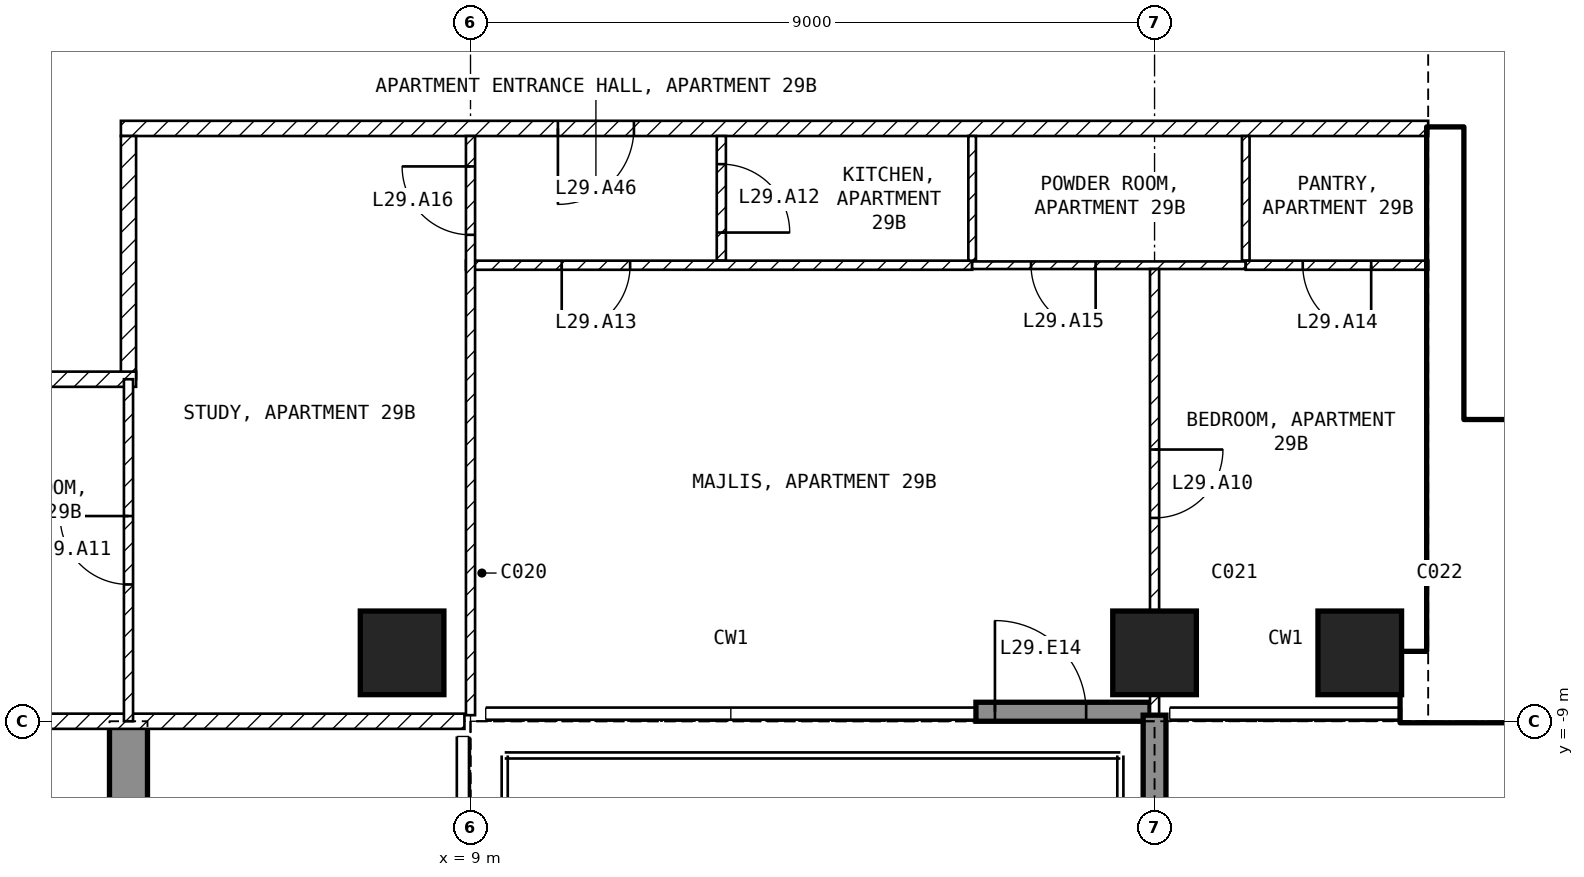
"""IFC4 building model, lengths in metres.
Left out: names, types, materials, properties, quantities, classifications, styles, units other than length and angle.
Written with IfcOpenShell. Run it as: python <this file> out.ifc"""

import sys

from ifc_helpers import new_model, si_unit, direction, frame, frame_2d, origin, origin_2d, place, context, subcontext, project, spatial, polyline, rectangle, outline, extrude, element, fill, save


model = new_model("IFC4")
c1 = context("Model", 3, precision=1e-05, world=origin(), true_north=direction((0.0, 1.0)))
c2 = subcontext(c1, "Body", "Model", "MODEL_VIEW")
j1 = project(units=[si_unit("LENGTHUNIT", "METRE"), si_unit("PLANEANGLEUNIT", "RADIAN")], contexts=[c1])
p1 = place(None, origin())
s1 = spatial("IfcSite", under=j1, at=p1, CompositionType="ELEMENT")
p2 = place(p1, origin())
s2 = spatial("IfcBuilding", under=s1, at=p2, CompositionType="ELEMENT")
p3 = place(p2, frame((0.0, 0.0, 123.4)))
s3 = spatial("IfcBuildingStorey", under=s2, at=p3, CompositionType="ELEMENT", Elevation=123.4)
for number, where, z_axis, x_axis in (
    (1, (8.1, -8.1, -0.25), (0.0, 0.0, 1.0), (1.0, 0.0, 0.0)),
    (2, (18.0, -8.1, -0.25), (0.0, 0.0, 1.0), (1.0, 0.0, 0.0)),
    (3, (20.7, -8.1, -0.25), (0.0, 0.0, 1.0), (1.0, 0.0, 0.0)),
):
    element("IfcColumn", number, at=place(p3, frame(where, z_axis=z_axis, x_axis=x_axis)), inside=s3, PredefinedType="COLUMN", context=c2, shape_type="SweptSolid", body=[
        extrude(rectangle(XDim=1.1, YDim=1.1, at=origin_2d()), origin(), (0.0, 0.0, 1.0), 3.5),
    ])
p4 = place(p3, frame((4.25, -20.15, -0.25), z_axis=(1.0, 0.0, 0.0), x_axis=(0.0, 1.0, 0.0)))
e4 = element("IfcWall", 4, at=p4, inside=s3, PredefinedType="SHEAR", context=c2, shape_type="SweptSolid", body=[
    extrude(outline(polyline([(0.0, 0.0), (6.65, 0.0), (6.65, 2.65), (9.05, 2.65), (9.05, 0.0), (11.15, 0.0), (11.15, 3.5), (0.0, 3.5), (0.0, 0.0)])), origin(), (0.0, 0.0, 1.0), 0.5),
])
p5 = place(p3, frame((15.65, -8.875, 0.0), z_axis=(0.0, 0.0, 1.0), x_axis=(1.0, 0.0, 0.0)))
e5 = element("IfcWall", 5, at=p5, inside=s3, PredefinedType="SOLIDWALL", context=c2, shape_type="SweptSolid", body=[
    extrude(rectangle(XDim=2.29, YDim=0.25, at=frame_2d((1.145, 0.0))), origin(), (0.0, 0.0, 1.0), 3.25),
])
p6 = place(p5, frame((0.25, 0.0, 0.0)))
e6 = element("IfcOpeningElement", 6, at=p6, cuts=e5, PredefinedType="OPENING", context=c2, shape_type="SweptSolid", body=[
    extrude(rectangle(XDim=1.2, YDim=2.4, at=frame_2d((0.6, 1.2))), frame((0.0, 0.135, 0.0), z_axis=(0.0, -1.0, 0.0), x_axis=(1.0, 0.0, 0.0)), (0.0, 0.0, 1.0), 0.27),
])
p7 = place(p3, frame((18.0, -8.92, 0.0), z_axis=(0.0, 0.0, 1.0), x_axis=(0.0, -1.0, 0.0)))
e7 = element("IfcWall", 7, at=p7, inside=s3, PredefinedType="SOLIDWALL", context=c2, shape_type="SweptSolid", body=[
    extrude(rectangle(XDim=2.82, YDim=0.3, at=frame_2d((1.41, 0.0))), origin(), (0.0, 0.0, 1.0), 3.25),
])
p8 = place(p3, frame((21.25, -8.55, 0.0), z_axis=(0.0, 0.0, 1.0), x_axis=(1.0, 0.0, 0.0)))
e8 = element("IfcWall", 8, at=p8, inside=s3, PredefinedType="SHEAR", context=c2, shape_type="SweptSolid", body=[
    extrude(rectangle(XDim=8.95, YDim=0.9, at=frame_2d((4.475, 0.0))), origin(), (0.0, 0.0, 1.0), 3.25),
])
p9 = place(p3, frame((21.825, -8.1, 0.0), z_axis=(0.0, 0.0, 1.0), x_axis=(0.0, 1.0, 0.0)))
e9 = element("IfcWall", 9, at=p9, inside=s3, PredefinedType="SHEAR", context=c2, shape_type="SweptSolid", body=[
    extrude(rectangle(XDim=6.9, YDim=0.45, at=frame_2d((3.45, 0.0))), origin(), (0.0, 0.0, 1.0), 3.25),
])
p10 = place(p3, frame((22.05, -5.15, 0.0), z_axis=(0.0, 0.0, 1.0), x_axis=(1.0, 0.0, 0.0)))
e10 = element("IfcWall", 10, at=p10, inside=s3, PredefinedType="SOLIDWALL", context=c2, shape_type="SweptSolid", body=[
    extrude(rectangle(XDim=6.3, YDim=0.2, at=frame_2d((3.15, 0.0))), origin(), (0.0, 0.0, 1.0), 3.25),
])
p11 = place(p10, frame((0.2, 0.0, 0.0)))
e11 = element("IfcOpeningElement", 11, at=p11, cuts=e10, PredefinedType="OPENING", context=c2, shape_type="SweptSolid", body=[
    extrude(rectangle(XDim=1.0, YDim=2.1, at=frame_2d((0.5, 1.05))), frame((0.0, 0.11, 0.0), z_axis=(0.0, -1.0, 0.0), x_axis=(1.0, 0.0, 0.0)), (0.0, 0.0, 1.0), 0.22),
])
p12 = place(p3, frame((21.6, -1.2, 0.0), z_axis=(0.0, 0.0, 1.0), x_axis=(-1.0, 0.0, 0.0)))
e12 = element("IfcWall", 12, at=p12, inside=s3, PredefinedType="PARTITIONING", context=c2, shape_type="SweptSolid", body=[
    extrude(rectangle(XDim=17.2, YDim=0.2, at=frame_2d((8.6, 0.0))), origin(), (0.0, 0.0, 1.0), 3.25),
])
p13 = place(p12, frame((10.45, 0.0, 0.0)))
e13 = element("IfcOpeningElement", 13, at=p13, cuts=e12, PredefinedType="OPENING", context=c2, shape_type="SweptSolid", body=[
    extrude(rectangle(XDim=1.0, YDim=2.1, at=frame_2d((0.5, 1.05))), frame((0.0, 0.11, 0.0), z_axis=(0.0, -1.0, 0.0), x_axis=(1.0, 0.0, 0.0)), (0.0, 0.0, 1.0), 0.22),
])
p14 = place(p3, frame((4.5, -1.3, 0.0), z_axis=(0.0, 0.0, 1.0), x_axis=(0.0, -1.0, 0.0)))
e14 = element("IfcWall", 14, at=p14, inside=s3, PredefinedType="PARTITIONING", context=c2, shape_type="SweptSolid", body=[
    extrude(rectangle(XDim=3.2, YDim=0.2, at=frame_2d((1.6, 0.0))), origin(), (0.0, 0.0, 1.0), 3.25),
])
p15 = place(p3, frame((4.6, -4.5, 0.0), z_axis=(0.0, 0.0, 1.0), x_axis=(-1.0, 0.0, 0.0)))
e15 = element("IfcWall", 15, at=p15, inside=s3, PredefinedType="PARTITIONING", context=c2, shape_type="SweptSolid", body=[
    extrude(rectangle(XDim=3.5, YDim=0.2, at=frame_2d((1.75, 0.0))), origin(), (0.0, 0.0, 1.0), 3.25),
])
p16 = place(p3, frame((8.92, -9.0, 0.0), z_axis=(0.0, 0.0, 1.0), x_axis=(-1.0, 0.0, 0.0)))
e16 = element("IfcWall", 16, at=p16, inside=s3, PredefinedType="PARTITIONING", context=c2, shape_type="SweptSolid", body=[
    extrude(rectangle(XDim=17.84, YDim=0.2, at=frame_2d((8.92, 0.0))), origin(), (0.0, 0.0, 1.0), 3.25),
])
p17 = place(p16, frame((8.42, 0.0, 0.0)))
e17 = element("IfcOpeningElement", 17, at=p17, cuts=e16, PredefinedType="OPENING", context=c2, shape_type="SweptSolid", body=[
    extrude(rectangle(XDim=1.0, YDim=2.1, at=frame_2d((0.5, 1.05))), frame((0.0, 0.11, 0.0), z_axis=(0.0, -1.0, 0.0), x_axis=(1.0, 0.0, 0.0)), (0.0, 0.0, 1.0), 0.22),
])
p18 = place(p3, frame((12.3, -1.3, 0.0), z_axis=(0.0, 0.0, 1.0), x_axis=(0.0, -1.0, 0.0)))
e18 = element("IfcWall", 18, at=p18, inside=s3, PredefinedType="PARTITIONING", context=c2, shape_type="SweptSolid", body=[
    extrude(rectangle(XDim=1.64, YDim=0.12, at=frame_2d((0.82, 0.0))), origin(), (0.0, 0.0, 1.0), 3.25),
])
p19 = place(p18, frame((0.37, 0.0, 0.0)))
e19 = element("IfcOpeningElement", 19, at=p19, cuts=e18, PredefinedType="OPENING", context=c2, shape_type="SweptSolid", body=[
    extrude(rectangle(XDim=0.9, YDim=2.1, at=frame_2d((0.45, 1.05))), frame((0.0, 0.07, 0.0), z_axis=(0.0, -1.0, 0.0), x_axis=(1.0, 0.0, 0.0)), (0.0, 0.0, 1.0), 0.14),
])
p20 = place(p3, frame((15.6, -3.0, 0.0), z_axis=(0.0, 0.0, 1.0), x_axis=(-1.0, 0.0, 0.0)))
e20 = element("IfcWall", 20, at=p20, inside=s3, PredefinedType="PARTITIONING", context=c2, shape_type="SweptSolid", body=[
    extrude(rectangle(XDim=6.66, YDim=0.12, at=frame_2d((3.33, 0.0))), origin(), (0.0, 0.0, 1.0), 3.25),
])
p21 = place(p20, frame((4.5, 0.0, 0.0)))
e21 = element("IfcOpeningElement", 21, at=p21, cuts=e20, PredefinedType="OPENING", context=c2, shape_type="SweptSolid", body=[
    extrude(rectangle(XDim=0.9, YDim=2.1, at=frame_2d((0.45, 1.05))), frame((0.0, 0.07, 0.0), z_axis=(0.0, -1.0, 0.0), x_axis=(1.0, 0.0, 0.0)), (0.0, 0.0, 1.0), 0.14),
])
p22 = place(p3, frame((9.0, -8.92, 0.0), z_axis=(0.0, 0.0, 1.0), x_axis=(0.0, 1.0, 0.0)))
e22 = element("IfcWall", 22, at=p22, inside=s3, PredefinedType="PARTITIONING", context=c2, shape_type="SweptSolid", body=[
    extrude(rectangle(XDim=7.62, YDim=0.12, at=frame_2d((3.81, 0.0))), origin(), (0.0, 0.0, 1.0), 3.25),
])
p23 = place(p22, frame((6.32, 0.0, 0.0)))
e23 = element("IfcOpeningElement", 23, at=p23, cuts=e22, PredefinedType="OPENING", context=c2, shape_type="SweptSolid", body=[
    extrude(rectangle(XDim=0.9, YDim=2.1, at=frame_2d((0.45, 1.05))), frame((0.0, 0.07, 0.0), z_axis=(0.0, -1.0, 0.0), x_axis=(1.0, 0.0, 0.0)), (0.0, 0.0, 1.0), 0.14),
])
for number, where, z_axis, x_axis in (
    (24, (15.6, -1.3, 0.0), (0.0, 0.0, 1.0), (0.0, -1.0, 0.0)),
    (25, (19.2, -1.3, 0.0), (0.0, 0.0, 1.0), (0.0, -1.0, 0.0)),
):
    element("IfcWall", number, at=place(p3, frame(where, z_axis=z_axis, x_axis=x_axis)), inside=s3, PredefinedType="PARTITIONING", context=c2, shape_type="SweptSolid", body=[
        extrude(rectangle(XDim=1.64, YDim=0.1, at=frame_2d((0.82, 0.0))), origin(), (0.0, 0.0, 1.0), 3.25),
    ])
p24 = place(p3, frame((19.2, -3.0, 0.0), z_axis=(0.0, 0.0, 1.0), x_axis=(-1.0, 0.0, 0.0)))
e26 = element("IfcWall", 26, at=p24, inside=s3, PredefinedType="PARTITIONING", context=c2, shape_type="SweptSolid", body=[
    extrude(rectangle(XDim=3.6, YDim=0.1, at=frame_2d((1.8, 0.0))), origin(), (0.0, 0.0, 1.0), 3.25),
])
p25 = place(p24, frame((1.975, 0.0, 0.0)))
e27 = element("IfcOpeningElement", 27, at=p25, cuts=e26, PredefinedType="OPENING", context=c2, shape_type="SweptSolid", body=[
    extrude(rectangle(XDim=0.85, YDim=2.1, at=frame_2d((0.425, 1.05))), frame((0.0, 0.06, 0.0), z_axis=(0.0, -1.0, 0.0), x_axis=(1.0, 0.0, 0.0)), (0.0, 0.0, 1.0), 0.12),
])
p26 = place(p3, frame((21.6, -3.0, 0.0), z_axis=(0.0, 0.0, 1.0), x_axis=(-1.0, 0.0, 0.0)))
e28 = element("IfcWall", 28, at=p26, inside=s3, PredefinedType="PARTITIONING", context=c2, shape_type="SweptSolid", body=[
    extrude(rectangle(XDim=2.4, YDim=0.12, at=frame_2d((1.2, 0.0))), origin(), (0.0, 0.0, 1.0), 3.25),
])
p27 = place(p26, frame((0.75, 0.0, 0.0)))
e29 = element("IfcOpeningElement", 29, at=p27, cuts=e28, PredefinedType="OPENING", context=c2, shape_type="SweptSolid", body=[
    extrude(rectangle(XDim=0.9, YDim=2.1, at=frame_2d((0.45, 1.05))), frame((0.0, 0.07, 0.0), z_axis=(0.0, -1.0, 0.0), x_axis=(1.0, 0.0, 0.0)), (0.0, 0.0, 1.0), 0.14),
])
p28 = place(p3, frame((18.0, -3.05, 0.0), z_axis=(0.0, 0.0, 1.0), x_axis=(0.0, -1.0, 0.0)))
e30 = element("IfcWall", 30, at=p28, inside=s3, PredefinedType="PARTITIONING", context=c2, shape_type="SweptSolid", body=[
    extrude(rectangle(XDim=5.87, YDim=0.12, at=frame_2d((2.935, 0.0))), origin(), (0.0, 0.0, 1.0), 2.414),
])
p29 = place(p28, frame((2.375, 0.0, 0.0)))
e31 = element("IfcOpeningElement", 31, at=p29, cuts=e30, PredefinedType="OPENING", context=c2, shape_type="SweptSolid", body=[
    extrude(rectangle(XDim=0.9, YDim=2.1, at=frame_2d((0.45, 1.05))), frame((0.0, 0.07, 0.0), z_axis=(0.0, -1.0, 0.0), x_axis=(1.0, 0.0, 0.0)), (0.0, 0.0, 1.0), 0.14),
])
p30 = place(p3, frame((4.5, -9.0, 0.0), z_axis=(0.0, 0.0, 1.0), x_axis=(0.0, 1.0, 0.0)))
e32 = element("IfcWall", 32, at=p30, inside=s3, PredefinedType="PARTITIONING", context=c2, shape_type="SweptSolid", body=[
    extrude(rectangle(XDim=4.5, YDim=0.12, at=frame_2d((2.25, 0.0))), origin(), (0.0, 0.0, 1.0), 3.25),
])
p31 = place(p30, frame((1.8, 0.0, 0.0)))
e33 = element("IfcOpeningElement", 33, at=p31, cuts=e32, PredefinedType="OPENING", context=c2, shape_type="SweptSolid", body=[
    extrude(rectangle(XDim=0.9, YDim=2.1, at=frame_2d((0.45, 1.05))), frame((0.0, 0.07, 0.0), z_axis=(0.0, -1.0, 0.0), x_axis=(1.0, 0.0, 0.0)), (0.0, 0.0, 1.0), 0.14),
])
p32 = place(p6, origin())
e34 = element("IfcDoor", 34, at=p32, inside=s3, OperationType="SINGLE_SWING_LEFT", PredefinedType="DOOR", context=c2, shape_type="SweptSolid", body=[
    extrude(rectangle(XDim=1.2, YDim=2.4, at=frame_2d((0.6, 1.2))), frame((0.0, 0.025, 0.0), z_axis=(0.0, -1.0, 0.0), x_axis=(1.0, 0.0, 0.0)), (0.0, 0.0, 1.0), 0.05),
])
fill(e6, e34)
p33 = place(p11, origin())
e35 = element("IfcDoor", 35, at=p33, inside=s3, OperationType="SINGLE_SWING_LEFT", PredefinedType="DOOR", context=c2, shape_type="SweptSolid", body=[
    extrude(rectangle(XDim=1.0, YDim=2.1, at=frame_2d((0.5, 1.05))), frame((0.0, 0.025, 0.0), z_axis=(0.0, -1.0, 0.0), x_axis=(1.0, 0.0, 0.0)), (0.0, 0.0, 1.0), 0.05),
])
fill(e11, e35)
p34 = place(p29, origin())
e36 = element("IfcDoor", 36, at=p34, inside=s3, OperationType="SINGLE_SWING_LEFT", PredefinedType="DOOR", context=c2, shape_type="SweptSolid", body=[
    extrude(rectangle(XDim=0.9, YDim=2.1, at=frame_2d((0.45, 1.05))), frame((0.0, 0.025, 0.0), z_axis=(0.0, -1.0, 0.0), x_axis=(1.0, 0.0, 0.0)), (0.0, 0.0, 1.0), 0.05),
])
fill(e31, e36)
p35 = place(p31, origin())
e37 = element("IfcDoor", 37, at=p35, inside=s3, OperationType="SINGLE_SWING_RIGHT", PredefinedType="DOOR", context=c2, shape_type="SweptSolid", body=[
    extrude(rectangle(XDim=0.9, YDim=2.1, at=frame_2d((0.45, 1.05))), frame((0.0, 0.025, 0.0), z_axis=(0.0, -1.0, 0.0), x_axis=(1.0, 0.0, 0.0)), (0.0, 0.0, 1.0), 0.05),
])
fill(e33, e37)
p36 = place(p19, origin())
e38 = element("IfcDoor", 38, at=p36, inside=s3, OperationType="SINGLE_SWING_RIGHT", PredefinedType="DOOR", context=c2, shape_type="SweptSolid", body=[
    extrude(rectangle(XDim=0.9, YDim=2.1, at=frame_2d((0.45, 1.05))), frame((0.0, 0.025, 0.0), z_axis=(0.0, -1.0, 0.0), x_axis=(1.0, 0.0, 0.0)), (0.0, 0.0, 1.0), 0.05),
])
fill(e19, e38)
p37 = place(p21, origin())
e39 = element("IfcDoor", 39, at=p37, inside=s3, OperationType="SINGLE_SWING_RIGHT", PredefinedType="DOOR", context=c2, shape_type="SweptSolid", body=[
    extrude(rectangle(XDim=0.9, YDim=2.1, at=frame_2d((0.45, 1.05))), frame((0.0, 0.025, 0.0), z_axis=(0.0, -1.0, 0.0), x_axis=(1.0, 0.0, 0.0)), (0.0, 0.0, 1.0), 0.05),
])
fill(e21, e39)
p38 = place(p27, origin())
e40 = element("IfcDoor", 40, at=p38, inside=s3, OperationType="SINGLE_SWING_LEFT", PredefinedType="DOOR", context=c2, shape_type="SweptSolid", body=[
    extrude(rectangle(XDim=0.9, YDim=2.1, at=frame_2d((0.45, 1.05))), frame((0.0, 0.025, 0.0), z_axis=(0.0, -1.0, 0.0), x_axis=(1.0, 0.0, 0.0)), (0.0, 0.0, 1.0), 0.05),
])
fill(e29, e40)
p39 = place(p25, origin())
e41 = element("IfcDoor", 41, at=p39, inside=s3, OperationType="SINGLE_SWING_LEFT", PredefinedType="DOOR", context=c2, shape_type="SweptSolid", body=[
    extrude(rectangle(XDim=0.85, YDim=2.1, at=frame_2d((0.425, 1.05))), frame((0.0, 0.025, 0.0), z_axis=(0.0, -1.0, 0.0), x_axis=(1.0, 0.0, 0.0)), (0.0, 0.0, 1.0), 0.05),
])
fill(e27, e41)
p40 = place(p23, origin())
e42 = element("IfcDoor", 42, at=p40, inside=s3, OperationType="SINGLE_SWING_RIGHT", PredefinedType="DOOR", context=c2, shape_type="SweptSolid", body=[
    extrude(rectangle(XDim=0.9, YDim=2.1, at=frame_2d((0.45, 1.05))), frame((0.0, 0.025, 0.0), z_axis=(0.0, -1.0, 0.0), x_axis=(1.0, 0.0, 0.0)), (0.0, 0.0, 1.0), 0.05),
])
fill(e23, e42)
p41 = place(p13, origin())
e43 = element("IfcDoor", 43, at=p41, inside=s3, OperationType="SINGLE_SWING_RIGHT", PredefinedType="DOOR", context=c2, shape_type="SweptSolid", body=[
    extrude(rectangle(XDim=1.0, YDim=2.1, at=frame_2d((0.5, 1.05))), frame((0.0, 0.025, 0.0), z_axis=(0.0, -1.0, 0.0), x_axis=(1.0, 0.0, 0.0)), (0.0, 0.0, 1.0), 0.05),
])
fill(e13, e43)
save(model, sys.argv[1])
